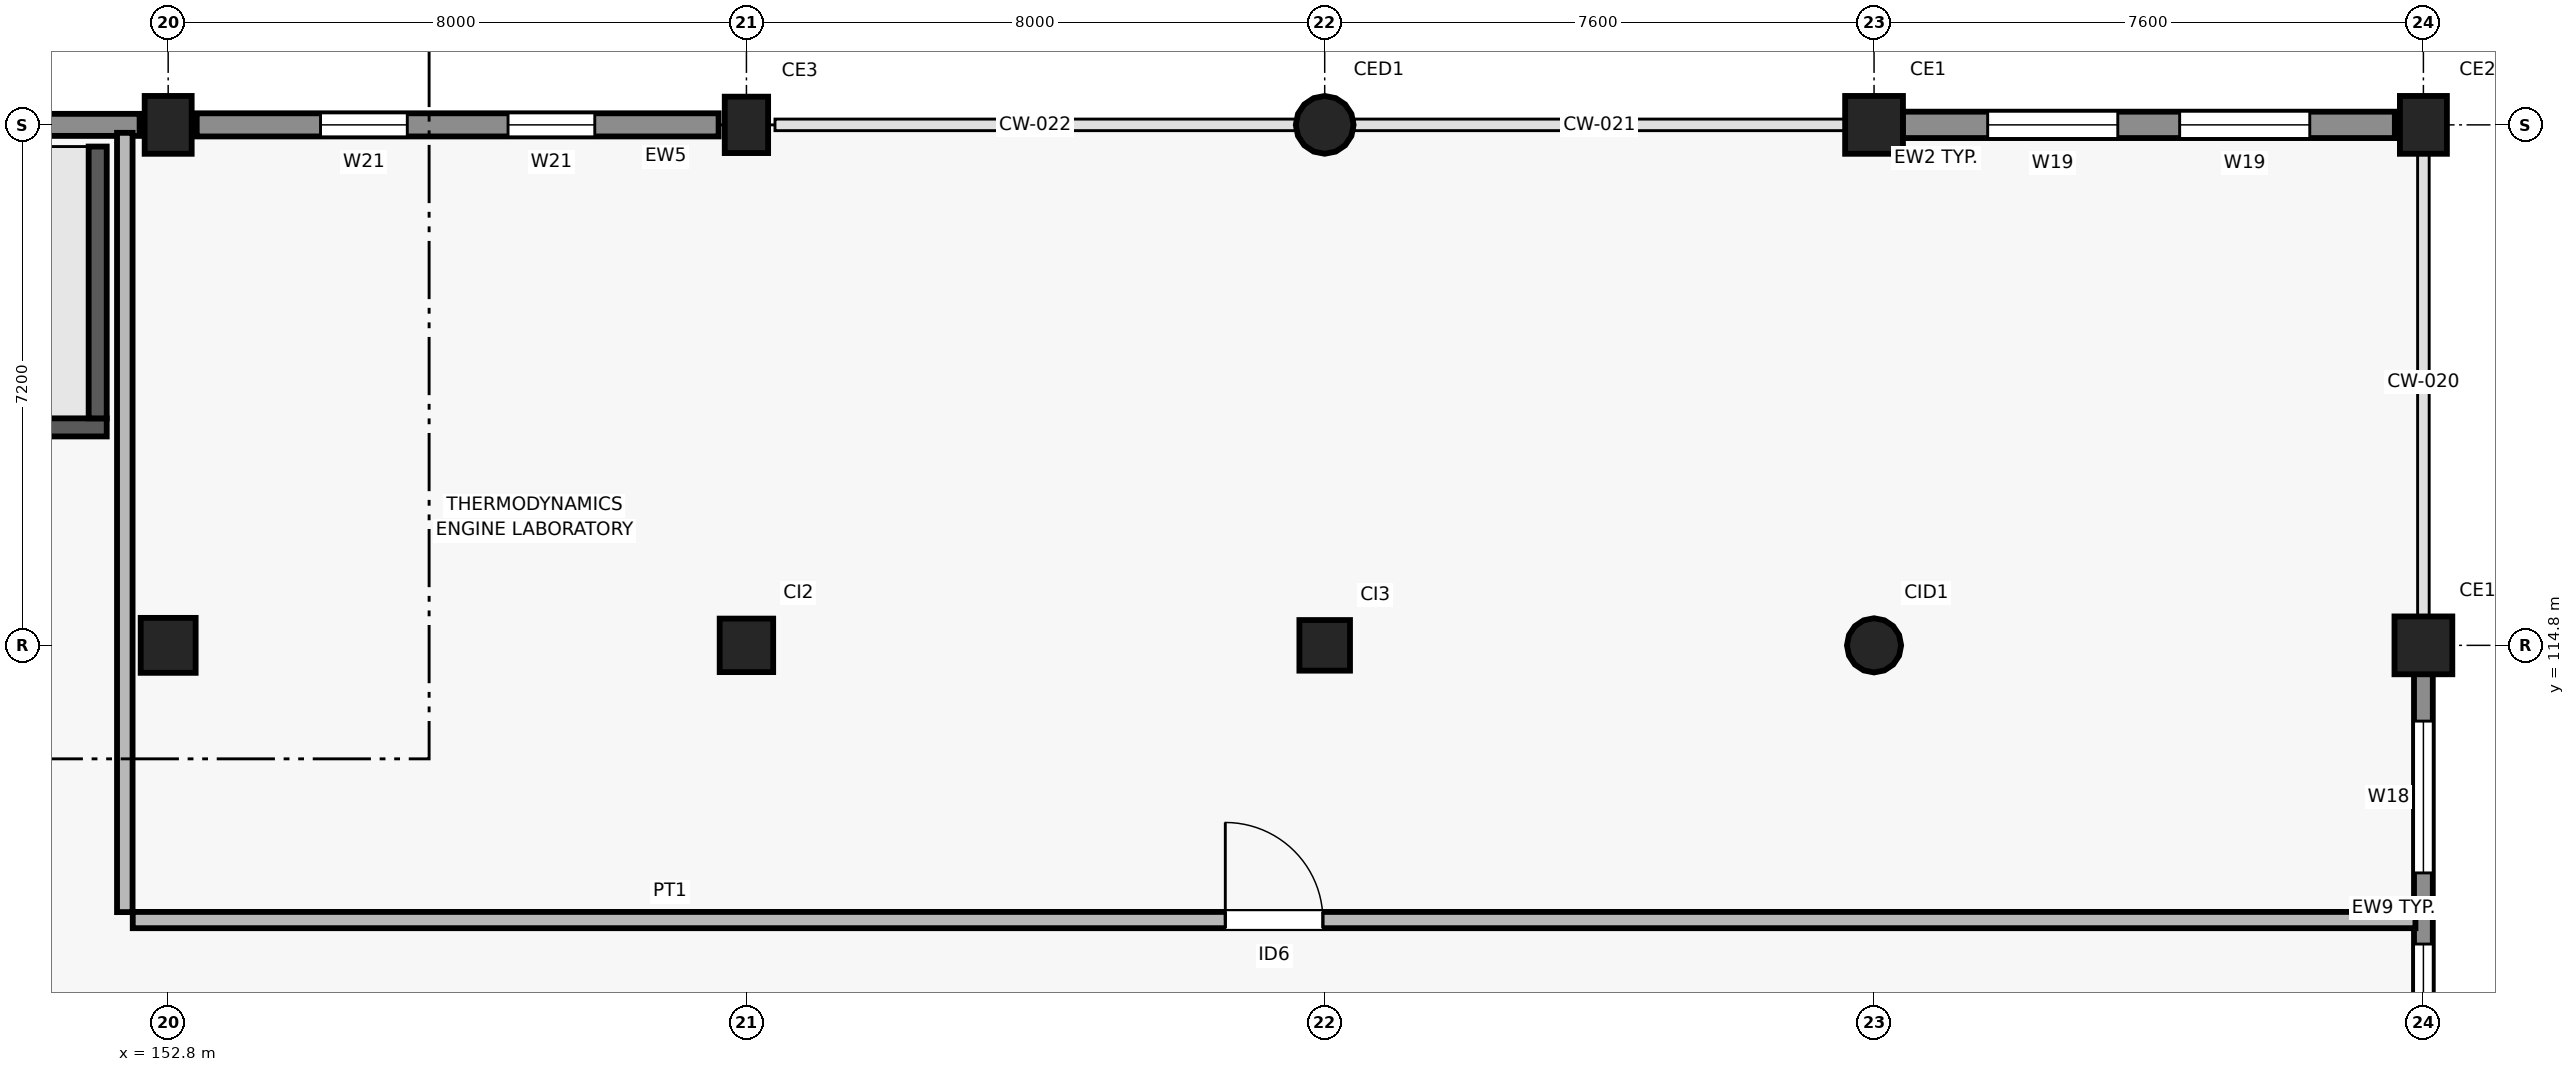
"""IFC4 building model, lengths in metres.
Left out: names, types, materials, properties, quantities, classifications, styles, units other than length and angle.
Written with IfcOpenShell. Run it as: python <this file> out.ifc"""

import sys

from ifc_helpers import new_model, si_unit, direction, frame, frame_2d, origin, origin_2d, place, context, subcontext, project, spatial, rectangle, circle, extrude, element, fill, save


model = new_model("IFC4")
c1 = context("Model", 3, precision=1e-05, world=origin(), true_north=direction((0.0, 1.0)))
c2 = subcontext(c1, "Body", "Model", "MODEL_VIEW")
j1 = project(units=[si_unit("LENGTHUNIT", "METRE"), si_unit("PLANEANGLEUNIT", "RADIAN")], contexts=[c1])
p1 = place(None, origin())
s1 = spatial("IfcSite", under=j1, at=p1, CompositionType="ELEMENT")
p2 = place(p1, origin())
s2 = spatial("IfcBuilding", under=s1, at=p2, CompositionType="ELEMENT")
p3 = place(p2, origin())
s3 = spatial("IfcBuildingStorey", under=s2, at=p3, CompositionType="ELEMENT", Elevation=0.0)
p4 = place(p3, frame((152.8, 114.8, 0.0), z_axis=(0.0, 0.0, 1.0), x_axis=(1.0, 0.0, 0.0)))
e1 = element("IfcColumn", 1, at=p4, inside=s3, PredefinedType="COLUMN", context=c2, shape_type="SweptSolid", body=[
    extrude(rectangle(XDim=0.76, YDim=0.76, at=origin_2d()), origin(), (0.0, 0.0, 1.0), 4.5),
])
p5 = place(p3, frame((152.8, 122.0, 0.0), z_axis=(0.0, 0.0, 1.0), x_axis=(1.0, 0.0, 0.0)))
e2 = element("IfcColumn", 2, at=p5, inside=s3, PredefinedType="COLUMN", context=c2, shape_type="SweptSolid", body=[
    extrude(rectangle(XDim=0.8, YDim=0.65, at=origin_2d()), origin(), (0.0, 0.0, 1.0), 4.5),
])
p6 = place(p3, frame((160.8, 114.8, 0.0), z_axis=(0.0, 0.0, 1.0), x_axis=(1.0, 0.0, 0.0)))
e3 = element("IfcColumn", 3, at=p6, inside=s3, PredefinedType="COLUMN", context=c2, shape_type="SweptSolid", body=[
    extrude(rectangle(XDim=0.74, YDim=0.74, at=origin_2d()), origin(), (0.0, 0.0, 1.0), 4.5),
])
p7 = place(p3, frame((160.8, 122.0, 0.0), z_axis=(0.0, 0.0, 1.0), x_axis=(1.0, 0.0, 0.0)))
e4 = element("IfcColumn", 4, at=p7, inside=s3, PredefinedType="COLUMN", context=c2, shape_type="SweptSolid", body=[
    extrude(rectangle(XDim=0.78, YDim=0.6, at=origin_2d()), origin(), (0.0, 0.0, 1.0), 4.5),
])
p8 = place(p3, frame((168.8, 114.8, 0.0), z_axis=(0.0, 0.0, 1.0), x_axis=(1.0, 0.0, 0.0)))
e5 = element("IfcColumn", 5, at=p8, inside=s3, PredefinedType="COLUMN", context=c2, shape_type="SweptSolid", body=[
    extrude(rectangle(XDim=0.7, YDim=0.7, at=origin_2d()), origin(), (0.0, 0.0, 1.0), 4.5),
])
p9 = place(p3, frame((168.8, 122.0, 0.0), z_axis=(0.0, 0.0, 1.0), x_axis=(1.0, 0.0, 0.0)))
e6 = element("IfcColumn", 6, at=p9, inside=s3, PredefinedType="COLUMN", context=c2, shape_type="SweptSolid", body=[
    extrude(circle(Radius=0.4, at=origin_2d()), origin(), (0.0, 0.0, 1.0), 4.5),
])
p10 = place(p3, frame((176.4, 114.8, 0.0), z_axis=(0.0, 0.0, 1.0), x_axis=(1.0, 0.0, 0.0)))
e7 = element("IfcColumn", 7, at=p10, inside=s3, PredefinedType="COLUMN", context=c2, shape_type="SweptSolid", body=[
    extrude(circle(Radius=0.375, at=origin_2d()), origin(), (0.0, 0.0, 1.0), 4.5),
])
for number, where, z_axis, x_axis in (
    (8, (176.4, 122.0, 0.0), (0.0, 0.0, 1.0), (1.0, 0.0, 0.0)),
    (9, (184.0, 114.8, 0.0), (0.0, 0.0, 1.0), (1.0, 0.0, 0.0)),
):
    element("IfcColumn", number, at=place(p3, frame(where, z_axis=z_axis, x_axis=x_axis)), inside=s3, PredefinedType="COLUMN", context=c2, shape_type="SweptSolid", body=[
        extrude(rectangle(XDim=0.8, YDim=0.8, at=origin_2d()), origin(), (0.0, 0.0, 1.0), 4.5),
    ])
p11 = place(p3, frame((184.0, 122.0, 0.0), z_axis=(0.0, 0.0, 1.0), x_axis=(1.0, 0.0, 0.0)))
e10 = element("IfcColumn", 10, at=p11, inside=s3, PredefinedType="COLUMN", context=c2, shape_type="SweptSolid", body=[
    extrude(rectangle(XDim=0.8, YDim=0.65, at=origin_2d()), origin(), (0.0, 0.0, 1.0), 4.5),
])
p12 = place(p3, frame((184.0, 107.936, 0.0), z_axis=(0.0, 0.0, 1.0), x_axis=(0.0, 1.0, 0.0)))
e11 = element("IfcWall", 11, at=p12, inside=s3, PredefinedType="SOLIDWALL", context=c2, shape_type="SweptSolid", body=[
    extrude(rectangle(XDim=6.469, YDim=0.26, at=frame_2d((3.234, 0.0))), origin(), (0.0, 0.0, 1.0), 3.76),
])
p13 = place(p12, frame((0.332, 0.0, 0.9)))
e12 = element("IfcOpeningElement", 12, at=p13, cuts=e11, PredefinedType="OPENING", context=c2, shape_type="SweptSolid", body=[
    extrude(rectangle(XDim=2.4, YDim=1.25, at=frame_2d((1.2, 0.625))), frame((0.0, 0.14, 0.0), z_axis=(0.0, -1.0, 0.0), x_axis=(1.0, 0.0, 0.0)), (0.0, 0.0, 1.0), 0.28),
])
p14 = place(p12, frame((3.716, 0.0, 0.9)))
e13 = element("IfcOpeningElement", 13, at=p14, cuts=e11, PredefinedType="OPENING", context=c2, shape_type="SweptSolid", body=[
    extrude(rectangle(XDim=2.1, YDim=1.25, at=frame_2d((1.05, 0.625))), frame((0.0, 0.14, 0.0), z_axis=(0.0, -1.0, 0.0), x_axis=(1.0, 0.0, 0.0)), (0.0, 0.0, 1.0), 0.28),
])
p15 = place(p3, frame((183.605, 122.0, 0.0), z_axis=(0.0, 0.0, 1.0), x_axis=(-1.0, 0.0, 0.0)))
e14 = element("IfcWall", 14, at=p15, inside=s3, PredefinedType="SOLIDWALL", context=c2, shape_type="SweptSolid", body=[
    extrude(rectangle(XDim=6.81, YDim=0.365, at=frame_2d((3.405, 0.0))), origin(), (0.0, 0.0, 1.0), 3.54),
])
p16 = place(p15, frame((1.177, 0.0, 0.9)))
e15 = element("IfcOpeningElement", 15, at=p16, cuts=e14, PredefinedType="OPENING", context=c2, shape_type="SweptSolid", body=[
    extrude(rectangle(XDim=1.8, YDim=1.25, at=frame_2d((0.9, 0.625))), frame((0.0, 0.192, 0.0), z_axis=(0.0, -1.0, 0.0), x_axis=(1.0, 0.0, 0.0)), (0.0, 0.0, 1.0), 0.385),
])
p17 = place(p15, frame((3.833, 0.0, 0.9)))
e16 = element("IfcOpeningElement", 16, at=p17, cuts=e14, PredefinedType="OPENING", context=c2, shape_type="SweptSolid", body=[
    extrude(rectangle(XDim=1.8, YDim=1.25, at=frame_2d((0.9, 0.625))), frame((0.0, 0.192, 0.0), z_axis=(0.0, -1.0, 0.0), x_axis=(1.0, 0.0, 0.0)), (0.0, 0.0, 1.0), 0.385),
])
p18 = place(p3, frame((160.415, 122.0, 0.0), z_axis=(0.0, 0.0, 1.0), x_axis=(-1.0, 0.0, 0.0)))
e17 = element("IfcWall", 17, at=p18, inside=s3, PredefinedType="SOLIDWALL", context=c2, shape_type="SweptSolid", body=[
    extrude(rectangle(XDim=7.22, YDim=0.32, at=frame_2d((3.61, 0.0))), origin(), (0.0, 0.0, 1.0), 3.57),
])
p19 = place(p18, frame((1.713, 0.0, 0.9)))
e18 = element("IfcOpeningElement", 18, at=p19, cuts=e17, PredefinedType="OPENING", context=c2, shape_type="SweptSolid", body=[
    extrude(rectangle(XDim=1.2, YDim=1.25, at=frame_2d((0.6, 0.625))), frame((0.0, 0.17, 0.0), z_axis=(0.0, -1.0, 0.0), x_axis=(1.0, 0.0, 0.0)), (0.0, 0.0, 1.0), 0.34),
])
p20 = place(p18, frame((4.307, 0.0, 0.9)))
e19 = element("IfcOpeningElement", 19, at=p20, cuts=e17, PredefinedType="OPENING", context=c2, shape_type="SweptSolid", body=[
    extrude(rectangle(XDim=1.2, YDim=1.25, at=frame_2d((0.6, 0.625))), frame((0.0, 0.17, 0.0), z_axis=(0.0, -1.0, 0.0), x_axis=(1.0, 0.0, 0.0)), (0.0, 0.0, 1.0), 0.34),
])
p21 = place(p3, frame((152.405, 122.0, 0.0), z_axis=(0.0, 0.0, 1.0), x_axis=(-1.0, 0.0, 0.0)))
e20 = element("IfcWall", 20, at=p21, inside=s3, PredefinedType="SOLIDWALL", context=c2, shape_type="SweptSolid", body=[
    extrude(rectangle(XDim=7.21, YDim=0.305, at=frame_2d((3.605, 0.0))), origin(), (0.0, 0.0, 1.0), 4.22),
])
p22 = place(p21, frame((3.73, 0.0, 0.0)))
e21 = element("IfcOpeningElement", 21, at=p22, cuts=e20, PredefinedType="OPENING", context=c2, shape_type="SweptSolid", body=[
    extrude(rectangle(XDim=1.35, YDim=2.2, at=frame_2d((0.675, 1.1))), frame((0.0, 0.162, 0.0), z_axis=(0.0, -1.0, 0.0), x_axis=(1.0, 0.0, 0.0)), (0.0, 0.0, 1.0), 0.325),
])
p23 = place(p3, frame((144.05, 117.815, 0.0), z_axis=(0.0, 0.0, 1.0), x_axis=(1.0, 0.0, 0.0)))
e22 = element("IfcWall", 22, at=p23, inside=s3, PredefinedType="SHEAR", context=c2, shape_type="SweptSolid", body=[
    extrude(rectangle(XDim=7.9, YDim=0.25, at=frame_2d((3.95, 0.0))), origin(), (0.0, 0.0, 1.0), 4.22),
])
p24 = place(p23, frame((0.5, 0.0, 0.0)))
e23 = element("IfcOpeningElement", 23, at=p24, cuts=e22, PredefinedType="OPENING", context=c2, shape_type="SweptSolid", body=[
    extrude(rectangle(XDim=1.25, YDim=2.2, at=frame_2d((0.625, 1.1))), frame((0.0, 0.135, 0.0), z_axis=(0.0, -1.0, 0.0), x_axis=(1.0, 0.0, 0.0)), (0.0, 0.0, 1.0), 0.27),
])
p25 = place(p3, frame((151.825, 117.94, 0.0), z_axis=(0.0, 0.0, 1.0), x_axis=(0.0, 1.0, 0.0)))
e24 = element("IfcWall", 24, at=p25, inside=s3, PredefinedType="SHEAR", context=c2, shape_type="SweptSolid", body=[
    extrude(rectangle(XDim=3.76, YDim=0.25, at=frame_2d((1.88, 0.0))), origin(), (0.0, 0.0, 1.0), 4.22),
])
p26 = place(p3, frame((152.31, 111.0, 0.0), z_axis=(0.0, 0.0, 1.0), x_axis=(1.0, 0.0, 0.0)))
e25 = element("IfcWall", 25, at=p26, inside=s3, PredefinedType="PARTITIONING", context=c2, shape_type="SweptSolid", body=[
    extrude(rectangle(XDim=31.58, YDim=0.225, at=frame_2d((15.79, 0.0))), origin(), (0.0, 0.0, 1.0), 3.76),
])
p27 = place(p26, frame((15.115, 0.0, 0.0)))
e26 = element("IfcOpeningElement", 26, at=p27, cuts=e25, PredefinedType="OPENING", context=c2, shape_type="SweptSolid", body=[
    extrude(rectangle(XDim=1.35, YDim=2.2, at=frame_2d((0.675, 1.1))), frame((0.0, 0.123, 0.0), z_axis=(0.0, -1.0, 0.0), x_axis=(1.0, 0.0, 0.0)), (0.0, 0.0, 1.0), 0.245),
])
p28 = place(p3, frame((152.2, 111.11, 0.0), z_axis=(0.0, 0.0, 1.0), x_axis=(0.0, 1.0, 0.0)))
e27 = element("IfcWall", 27, at=p28, inside=s3, PredefinedType="PARTITIONING", context=c2, shape_type="SweptSolid", body=[
    extrude(rectangle(XDim=10.78, YDim=0.215, at=frame_2d((5.39, 0.0))), origin(), (0.0, 0.0, 1.0), 4.2),
])
p29 = place(p13, origin())
e28 = element("IfcWindow", 28, at=p29, inside=s3, PartitioningType="SINGLE_PANEL", PredefinedType="WINDOW", context=c2, shape_type="SweptSolid", body=[
    extrude(rectangle(XDim=2.4, YDim=1.25, at=frame_2d((1.2, 0.625))), frame((0.0, 0.03, 0.0), z_axis=(0.0, -1.0, 0.0), x_axis=(1.0, 0.0, 0.0)), (0.0, 0.0, 1.0), 0.06),
])
fill(e12, e28)
p30 = place(p14, origin())
e29 = element("IfcWindow", 29, at=p30, inside=s3, PartitioningType="SINGLE_PANEL", PredefinedType="WINDOW", context=c2, shape_type="SweptSolid", body=[
    extrude(rectangle(XDim=2.1, YDim=1.25, at=frame_2d((1.05, 0.625))), frame((0.0, 0.03, 0.0), z_axis=(0.0, -1.0, 0.0), x_axis=(1.0, 0.0, 0.0)), (0.0, 0.0, 1.0), 0.06),
])
fill(e13, e29)
p31 = place(p16, origin())
e30 = element("IfcWindow", 30, at=p31, inside=s3, PartitioningType="SINGLE_PANEL", PredefinedType="WINDOW", context=c2, shape_type="SweptSolid", body=[
    extrude(rectangle(XDim=1.8, YDim=1.25, at=frame_2d((0.9, 0.625))), frame((0.0, 0.03, 0.0), z_axis=(0.0, -1.0, 0.0), x_axis=(1.0, 0.0, 0.0)), (0.0, 0.0, 1.0), 0.06),
])
fill(e15, e30)
p32 = place(p17, origin())
e31 = element("IfcWindow", 31, at=p32, inside=s3, PartitioningType="SINGLE_PANEL", PredefinedType="WINDOW", context=c2, shape_type="SweptSolid", body=[
    extrude(rectangle(XDim=1.8, YDim=1.25, at=frame_2d((0.9, 0.625))), frame((0.0, 0.03, 0.0), z_axis=(0.0, -1.0, 0.0), x_axis=(1.0, 0.0, 0.0)), (0.0, 0.0, 1.0), 0.06),
])
fill(e16, e31)
p33 = place(p19, origin())
e32 = element("IfcWindow", 32, at=p33, inside=s3, PartitioningType="SINGLE_PANEL", PredefinedType="WINDOW", context=c2, shape_type="SweptSolid", body=[
    extrude(rectangle(XDim=1.2, YDim=1.25, at=frame_2d((0.6, 0.625))), frame((0.0, 0.03, 0.0), z_axis=(0.0, -1.0, 0.0), x_axis=(1.0, 0.0, 0.0)), (0.0, 0.0, 1.0), 0.06),
])
fill(e18, e32)
p34 = place(p20, origin())
e33 = element("IfcWindow", 33, at=p34, inside=s3, PartitioningType="SINGLE_PANEL", PredefinedType="WINDOW", context=c2, shape_type="SweptSolid", body=[
    extrude(rectangle(XDim=1.2, YDim=1.25, at=frame_2d((0.6, 0.625))), frame((0.0, 0.03, 0.0), z_axis=(0.0, -1.0, 0.0), x_axis=(1.0, 0.0, 0.0)), (0.0, 0.0, 1.0), 0.06),
])
fill(e19, e33)
p35 = place(p27, origin())
e34 = element("IfcDoor", 34, at=p35, inside=s3, OperationType="SINGLE_SWING_LEFT", PredefinedType="DOOR", context=c2, shape_type="SweptSolid", body=[
    extrude(rectangle(XDim=1.35, YDim=2.2, at=frame_2d((0.675, 1.1))), frame((0.0, 0.025, 0.0), z_axis=(0.0, -1.0, 0.0), x_axis=(1.0, 0.0, 0.0)), (0.0, 0.0, 1.0), 0.05),
])
fill(e26, e34)
save(model, sys.argv[1])
